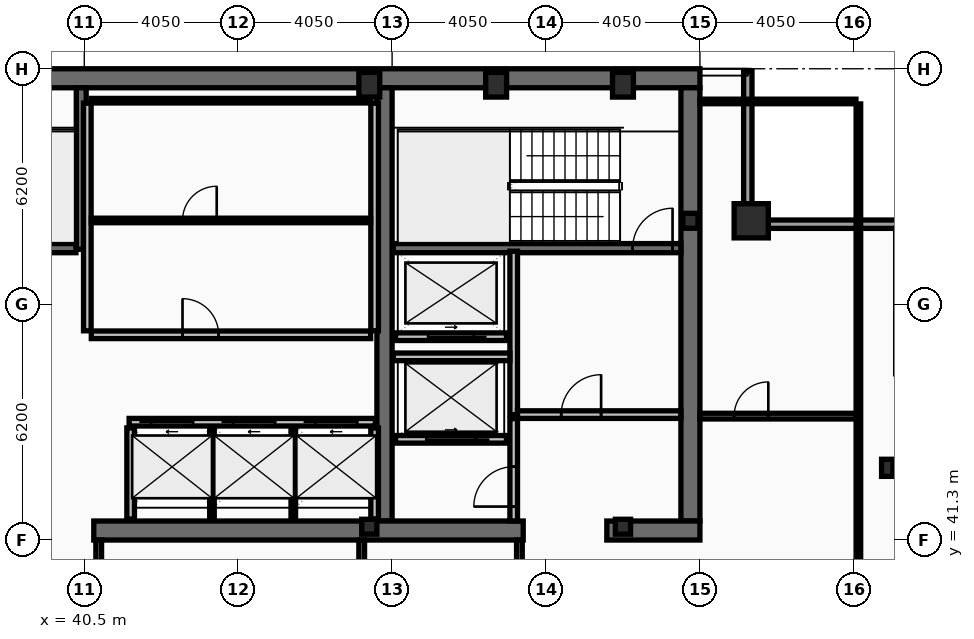
"""IFC4 building model, lengths in metres.
Left out: names, types, materials, properties, quantities, classifications, styles, units other than length and angle.
Written with IfcOpenShell. Run it as: python <this file> out.ifc"""

import sys

from ifc_helpers import new_model, si_unit, direction, frame, frame_2d, origin, origin_2d, place, context, subcontext, project, spatial, rectangle, hollow_rectangle, i_section, extrude, element, fill, save


model = new_model("IFC4")
c1 = context("Model", 3, precision=1e-05, world=origin(), true_north=direction((0.0, 1.0)))
c2 = subcontext(c1, "Body", "Model", "MODEL_VIEW")
j1 = project(units=[si_unit("LENGTHUNIT", "METRE"), si_unit("PLANEANGLEUNIT", "RADIAN")], contexts=[c1])
p1 = place(None, origin())
s1 = spatial("IfcSite", under=j1, at=p1, CompositionType="ELEMENT")
p2 = place(p1, origin())
s2 = spatial("IfcBuilding", under=s1, at=p2, CompositionType="ELEMENT")
p3 = place(p2, frame((0.0, 0.0, 302.2)))
s3 = spatial("IfcBuildingStorey", under=s2, at=p3, CompositionType="ELEMENT", Elevation=302.2)
p4 = place(p3, frame((16.2, 53.45, 0.0), z_axis=(0.0, 0.0, 1.0), x_axis=(1.0, 0.0, 0.0)))
e1 = element("IfcWall", 1, at=p4, inside=s3, PredefinedType="SHEAR", context=c2, shape_type="SweptSolid", body=[
    extrude(rectangle(XDim=40.5, YDim=0.5, at=frame_2d((20.25, 0.0))), origin(), (0.0, 0.0, 1.0), 3.38),
])
p5 = place(p3, frame((56.45, 53.2, 0.0), z_axis=(0.0, 0.0, 1.0), x_axis=(0.0, -1.0, 0.0)))
e2 = element("IfcWall", 2, at=p5, inside=s3, PredefinedType="SHEAR", context=c2, shape_type="SweptSolid", body=[
    extrude(rectangle(XDim=11.4, YDim=0.5, at=frame_2d((5.7, 0.0))), origin(), (0.0, 0.0, 1.0), 3.38),
])
p6 = place(p3, frame((48.4, 41.8, 0.0), z_axis=(0.0, 0.0, 1.0), x_axis=(0.0, 1.0, 0.0)))
e3 = element("IfcWall", 3, at=p6, inside=s3, PredefinedType="SHEAR", context=c2, shape_type="SweptSolid", body=[
    extrude(rectangle(XDim=11.4, YDim=0.4, at=frame_2d((5.7, 0.0))), origin(), (0.0, 0.0, 1.0), 3.38),
])
p7 = place(p3, frame((52.05, 41.55, 0.0), z_axis=(0.0, 0.0, 1.0), x_axis=(-1.0, 0.0, 0.0)))
e4 = element("IfcWall", 4, at=p7, inside=s3, PredefinedType="SHEAR", context=c2, shape_type="SweptSolid", body=[
    extrude(rectangle(XDim=11.3, YDim=0.5, at=frame_2d((5.65, 0.0))), origin(), (0.0, 0.0, 1.0), 3.38),
])
p8 = place(p3, frame((56.7, 41.55, 0.0), z_axis=(0.0, 0.0, 1.0), x_axis=(-1.0, 0.0, 0.0)))
e5 = element("IfcWall", 5, at=p8, inside=s3, PredefinedType="SHEAR", context=c2, shape_type="SweptSolid", body=[
    extrude(rectangle(XDim=2.45, YDim=0.5, at=frame_2d((1.225, 0.0))), origin(), (0.0, 0.0, 1.0), 3.38),
])
p9 = place(p3, frame((40.42, 48.95, 0.0), z_axis=(0.0, 0.0, 1.0), x_axis=(0.0, 1.0, 0.0)))
e6 = element("IfcWall", 6, at=p9, inside=s3, PredefinedType="SHEAR", context=c2, shape_type="SweptSolid", body=[
    extrude(rectangle(XDim=4.25, YDim=0.26, at=frame_2d((2.125, 0.0))), origin(), (0.0, 0.0, 1.0), 3.38),
])
p10 = place(p3, frame((48.63, 48.98, 0.0), z_axis=(0.0, 0.0, 1.0), x_axis=(1.0, 0.0, 0.0)))
e7 = element("IfcWall", 7, at=p10, inside=s3, PredefinedType="SHEAR", context=c2, shape_type="SweptSolid", body=[
    extrude(rectangle(XDim=7.57, YDim=0.24, at=frame_2d((3.785, 0.0))), origin(), (0.0, 0.0, 1.0), 3.38),
])
p11 = place(p10, frame((6.3, 0.0, 0.0)))
e8 = element("IfcOpeningElement", 8, at=p11, cuts=e7, PredefinedType="OPENING", context=c2, shape_type="SweptSolid", body=[
    extrude(rectangle(XDim=1.05, YDim=2.15, at=frame_2d((0.525, 1.075))), frame((0.0, 0.13, 0.0), z_axis=(0.0, -1.0, 0.0), x_axis=(1.0, 0.0, 0.0)), (0.0, 0.0, 1.0), 0.26),
])
p12 = place(p3, frame((32.72, 48.98, 0.0), z_axis=(0.0, 0.0, 1.0), x_axis=(1.0, 0.0, 0.0)))
e9 = element("IfcWall", 9, at=p12, inside=s3, PredefinedType="SHEAR", context=c2, shape_type="SweptSolid", body=[
    extrude(rectangle(XDim=7.56, YDim=0.24, at=frame_2d((3.78, 0.0))), origin(), (0.0, 0.0, 1.0), 3.38),
])
p13 = place(p12, frame((0.22, 0.0, 0.0)))
e10 = element("IfcOpeningElement", 10, at=p13, cuts=e9, PredefinedType="OPENING", context=c2, shape_type="SweptSolid", body=[
    extrude(rectangle(XDim=1.05, YDim=2.15, at=frame_2d((0.525, 1.075))), frame((0.0, 0.13, 0.0), z_axis=(0.0, -1.0, 0.0), x_axis=(1.0, 0.0, 0.0)), (0.0, 0.0, 1.0), 0.26),
])
p14 = place(p3, frame((58.05, 49.7, 0.0), z_axis=(0.0, 0.0, 1.0), x_axis=(1.0, 0.0, 0.0)))
e11 = element("IfcColumn", 11, at=p14, inside=s3, PredefinedType="COLUMN", context=c2, shape_type="SweptSolid", body=[
    extrude(hollow_rectangle(XDim=0.9, YDim=0.9, WallThickness=0.05, at=origin_2d()), origin(), (0.0, 0.0, 1.0), 3.6),
])
for number, where, z_axis, x_axis in (
    (12, (48.0, 53.28, 0.0), (0.0, 0.0, 1.0), (1.0, 0.0, 0.0)),
    (13, (51.337, 53.28, 0.0), (0.0, 0.0, 1.0), (1.0, 0.0, 0.0)),
    (14, (54.675, 53.28, 0.0), (0.0, 0.0, 1.0), (1.0, 0.0, 0.0)),
):
    element("IfcColumn", number, at=place(p3, frame(where, z_axis=z_axis, x_axis=x_axis)), inside=s3, PredefinedType="COLUMN", context=c2, shape_type="SweptSolid", body=[
        extrude(hollow_rectangle(XDim=0.55, YDim=0.65, WallThickness=0.04, at=origin_2d()), origin(), (0.0, 0.0, 1.0), 3.6),
    ])
p15 = place(p3, frame((61.63, 43.2, 0.0), z_axis=(0.0, 0.0, 1.0), x_axis=(1.0, 0.0, 0.0)))
e15 = element("IfcColumn", 15, at=p15, inside=s3, PredefinedType="COLUMN", context=c2, shape_type="SweptSolid", body=[
    extrude(i_section(OverallWidth=0.3, OverallDepth=0.45, WebThickness=0.014, FlangeThickness=0.026, at=origin_2d()), origin(), (0.0, 0.0, 1.0), 3.6),
])
for number, where, z_axis, x_axis in (
    (16, (56.45, 49.7, 0.0), (0.0, 0.0, 1.0), (1.0, 0.0, 0.0)),
    (17, (48.0, 41.65, 0.0), (0.0, 0.0, 1.0), (1.0, 0.0, 0.0)),
    (18, (54.675, 41.65, 0.0), (0.0, 0.0, 1.0), (1.0, 0.0, 0.0)),
):
    element("IfcColumn", number, at=place(p3, frame(where, z_axis=z_axis, x_axis=x_axis)), inside=s3, PredefinedType="COLUMN", context=c2, shape_type="SweptSolid", body=[
        extrude(i_section(OverallWidth=0.399, OverallDepth=0.393, WebThickness=0.023, FlangeThickness=0.037, at=origin_2d()), origin(), (0.0, 0.0, 1.0), 3.6),
    ])
p16 = place(p3, frame((57.96, 53.63, 0.0), z_axis=(0.0, 0.0, 1.0), x_axis=(0.0, -1.0, 0.0)))
e19 = element("IfcWall", 19, at=p16, inside=s3, PredefinedType="SOLIDWALL", context=c2, shape_type="SweptSolid", body=[
    extrude(rectangle(XDim=3.91, YDim=0.22, at=frame_2d((1.955, 0.0))), origin(), (0.0, 0.0, 1.0), 2.82),
])
p17 = place(p3, frame((57.85, 49.61, 0.0), z_axis=(0.0, 0.0, 1.0), x_axis=(1.0, 0.0, 0.0)))
e20 = element("IfcWall", 20, at=p17, inside=s3, PredefinedType="SOLIDWALL", context=c2, shape_type="SweptSolid", body=[
    extrude(rectangle(XDim=4.22, YDim=0.22, at=frame_2d((2.11, 0.0))), origin(), (0.0, 0.0, 1.0), 2.82),
])
p18 = place(p3, frame((41.68, 44.4, 0.0), z_axis=(0.0, 0.0, 1.0), x_axis=(1.0, 0.0, 0.0)))
e21 = element("IfcWall", 21, at=p18, inside=s3, PredefinedType="PARTITIONING", context=c2, shape_type="SweptSolid", body=[
    extrude(rectangle(XDim=6.48, YDim=0.2, at=frame_2d((3.24, 0.0))), origin(), (0.0, 0.0, 1.0), 3.38),
])
p19 = place(p18, frame((0.58, 0.0, 0.0)))
e22 = element("IfcOpeningElement", 22, at=p19, cuts=e21, PredefinedType="OPENING", context=c2, shape_type="SweptSolid", body=[
    extrude(rectangle(XDim=1.1, YDim=2.18, at=frame_2d((0.55, 1.09))), frame((0.0, 0.11, 0.0), z_axis=(0.0, -1.0, 0.0), x_axis=(1.0, 0.0, 0.0)), (0.0, 0.0, 1.0), 0.22),
])
p20 = place(p18, frame((2.74, 0.0, 0.0)))
e23 = element("IfcOpeningElement", 23, at=p20, cuts=e21, PredefinedType="OPENING", context=c2, shape_type="SweptSolid", body=[
    extrude(rectangle(XDim=1.1, YDim=2.18, at=frame_2d((0.55, 1.09))), frame((0.0, 0.11, 0.0), z_axis=(0.0, -1.0, 0.0), x_axis=(1.0, 0.0, 0.0)), (0.0, 0.0, 1.0), 0.22),
])
p21 = place(p18, frame((4.9, 0.0, 0.0)))
e24 = element("IfcOpeningElement", 24, at=p21, cuts=e21, PredefinedType="OPENING", context=c2, shape_type="SweptSolid", body=[
    extrude(rectangle(XDim=1.1, YDim=2.18, at=frame_2d((0.55, 1.09))), frame((0.0, 0.11, 0.0), z_axis=(0.0, -1.0, 0.0), x_axis=(1.0, 0.0, 0.0)), (0.0, 0.0, 1.0), 0.22),
])
p22 = place(p3, frame((51.61, 43.95, 0.0), z_axis=(0.0, 0.0, 1.0), x_axis=(-1.0, 0.0, 0.0)))
e25 = element("IfcWall", 25, at=p22, inside=s3, PredefinedType="PARTITIONING", context=c2, shape_type="SweptSolid", body=[
    extrude(rectangle(XDim=2.92, YDim=0.2, at=frame_2d((1.46, 0.0))), origin(), (0.0, 0.0, 1.0), 3.38),
])
p23 = place(p22, frame((0.81, 0.0, 0.0)))
e26 = element("IfcOpeningElement", 26, at=p23, cuts=e25, PredefinedType="OPENING", context=c2, shape_type="SweptSolid", body=[
    extrude(rectangle(XDim=1.3, YDim=2.18, at=frame_2d((0.65, 1.09))), frame((0.0, 0.11, 0.0), z_axis=(0.0, -1.0, 0.0), x_axis=(1.0, 0.0, 0.0)), (0.0, 0.0, 1.0), 0.22),
])
p24 = place(p3, frame((51.61, 46.65, 0.0), z_axis=(0.0, 0.0, 1.0), x_axis=(-1.0, 0.0, 0.0)))
e27 = element("IfcWall", 27, at=p24, inside=s3, PredefinedType="PARTITIONING", context=c2, shape_type="SweptSolid", body=[
    extrude(rectangle(XDim=2.92, YDim=0.2, at=frame_2d((1.46, 0.0))), origin(), (0.0, 0.0, 1.0), 3.38),
])
p25 = place(p24, frame((0.86, 0.0, 0.0)))
e28 = element("IfcOpeningElement", 28, at=p25, cuts=e27, PredefinedType="OPENING", context=c2, shape_type="SweptSolid", body=[
    extrude(rectangle(XDim=1.2, YDim=2.18, at=frame_2d((0.6, 1.09))), frame((0.0, 0.11, 0.0), z_axis=(0.0, -1.0, 0.0), x_axis=(1.0, 0.0, 0.0)), (0.0, 0.0, 1.0), 0.22),
])
p26 = place(p3, frame((51.8, 44.6, 0.0), z_axis=(0.0, 0.0, 1.0), x_axis=(0.0, 1.0, 0.0)))
e29 = element("IfcWall", 29, at=p26, inside=s3, PredefinedType="PARTITIONING", context=c2, shape_type="SweptSolid", body=[
    extrude(rectangle(XDim=4.3, YDim=0.2, at=frame_2d((2.15, 0.0))), origin(), (0.0, 0.0, 1.0), 3.38),
])
p27 = place(p3, frame((51.9, 44.6, 0.0), z_axis=(0.0, 0.0, 1.0), x_axis=(1.0, 0.0, 0.0)))
e30 = element("IfcWall", 30, at=p27, inside=s3, PredefinedType="PARTITIONING", context=c2, shape_type="SweptSolid", body=[
    extrude(rectangle(XDim=4.3, YDim=0.2, at=frame_2d((2.15, 0.0))), origin(), (0.0, 0.0, 1.0), 3.38),
])
p28 = place(p27, frame((1.15, 0.0, 0.0)))
e31 = element("IfcOpeningElement", 31, at=p28, cuts=e30, PredefinedType="OPENING", context=c2, shape_type="SweptSolid", body=[
    extrude(rectangle(XDim=1.05, YDim=2.15, at=frame_2d((0.525, 1.075))), frame((0.0, 0.11, 0.0), z_axis=(0.0, -1.0, 0.0), x_axis=(1.0, 0.0, 0.0)), (0.0, 0.0, 1.0), 0.22),
])
p29 = place(p3, frame((48.63, 46.12, 0.0), z_axis=(0.0, 0.0, 1.0), x_axis=(1.0, 0.0, 0.0)))
e32 = element("IfcWall", 32, at=p29, inside=s3, PredefinedType="PARTITIONING", context=c2, shape_type="SweptSolid", body=[
    extrude(rectangle(XDim=3.07, YDim=0.2, at=frame_2d((1.535, 0.0))), origin(), (0.0, 0.0, 1.0), 3.38),
])
p30 = place(p3, frame((51.8, 41.8, 0.0), z_axis=(0.0, 0.0, 1.0), x_axis=(0.0, 1.0, 0.0)))
e33 = element("IfcWall", 33, at=p30, inside=s3, PredefinedType="PARTITIONING", context=c2, shape_type="SweptSolid", body=[
    extrude(rectangle(XDim=2.695, YDim=0.2, at=frame_2d((1.348, 0.0))), origin(), (0.0, 0.0, 1.0), 3.38),
])
p31 = place(p30, frame((0.38, 0.0, 0.0)))
e34 = element("IfcOpeningElement", 34, at=p31, cuts=e33, PredefinedType="OPENING", context=c2, shape_type="SweptSolid", body=[
    extrude(rectangle(XDim=1.05, YDim=2.15, at=frame_2d((0.525, 1.075))), frame((0.0, 0.11, 0.0), z_axis=(0.0, -1.0, 0.0), x_axis=(1.0, 0.0, 0.0)), (0.0, 0.0, 1.0), 0.22),
])
for number, where, z_axis, x_axis in (
    (35, (40.58, 46.805, 0.0), (0.0, 0.0, 1.0), (0.0, 1.0, 0.0)),
    (36, (48.14, 46.805, 0.0), (0.0, 0.0, 1.0), (0.0, 1.0, 0.0)),
):
    element("IfcWall", number, at=place(p3, frame(where, z_axis=z_axis, x_axis=x_axis)), inside=s3, PredefinedType="PARTITIONING", context=c2, shape_type="SweptSolid", body=[
        extrude(rectangle(XDim=5.99, YDim=0.2, at=frame_2d((2.995, 0.0))), origin(), (0.0, 0.0, 1.0), 3.38),
    ])
p32 = place(p3, frame((40.685, 52.86, 0.0), z_axis=(0.0, 0.0, 1.0), x_axis=(1.0, 0.0, 0.0)))
e37 = element("IfcWall", 37, at=p32, inside=s3, PredefinedType="PARTITIONING", context=c2, shape_type="SweptSolid", body=[
    extrude(rectangle(XDim=7.35, YDim=0.12, at=frame_2d((3.675, 0.0))), origin(), (0.0, 0.0, 1.0), 3.38),
])
p33 = place(p3, frame((40.685, 49.709, 0.0), z_axis=(0.0, 0.0, 1.0), x_axis=(1.0, 0.0, 0.0)))
e38 = element("IfcWall", 38, at=p33, inside=s3, PredefinedType="PARTITIONING", context=c2, shape_type="SweptSolid", body=[
    extrude(rectangle(XDim=7.35, YDim=0.12, at=frame_2d((3.675, 0.0))), origin(), (0.0, 0.0, 1.0), 3.38),
])
p34 = place(p33, frame((2.4, 0.0, 0.0)))
e39 = element("IfcOpeningElement", 39, at=p34, cuts=e38, PredefinedType="OPENING", context=c2, shape_type="SweptSolid", body=[
    extrude(rectangle(XDim=0.9, YDim=2.05, at=frame_2d((0.45, 1.025))), frame((0.0, 0.07, 0.0), z_axis=(0.0, -1.0, 0.0), x_axis=(1.0, 0.0, 0.0)), (0.0, 0.0, 1.0), 0.14),
])
p35 = place(p3, frame((40.685, 46.7, 0.0), z_axis=(0.0, 0.0, 1.0), x_axis=(1.0, 0.0, 0.0)))
e40 = element("IfcWall", 40, at=p35, inside=s3, PredefinedType="PARTITIONING", context=c2, shape_type="SweptSolid", body=[
    extrude(rectangle(XDim=7.35, YDim=0.2, at=frame_2d((3.675, 0.0))), origin(), (0.0, 0.0, 1.0), 3.38),
])
p36 = place(p35, frame((2.4, 0.0, 0.0)))
e41 = element("IfcOpeningElement", 41, at=p36, cuts=e40, PredefinedType="OPENING", context=c2, shape_type="SweptSolid", body=[
    extrude(rectangle(XDim=0.95, YDim=2.1, at=frame_2d((0.475, 1.05))), frame((0.0, 0.11, 0.0), z_axis=(0.0, -1.0, 0.0), x_axis=(1.0, 0.0, 0.0)), (0.0, 0.0, 1.0), 0.22),
])
for number, where, z_axis, x_axis in (
    (42, (41.72, 41.85, 0.0), (0.0, 0.0, 1.0), (0.0, 1.0, 0.0)),
    (43, (48.14, 41.85, 0.0), (0.0, 0.0, 1.0), (0.0, 1.0, 0.0)),
):
    element("IfcWall", number, at=place(p3, frame(where, z_axis=z_axis, x_axis=x_axis)), inside=s3, PredefinedType="PARTITIONING", context=c2, shape_type="SweptSolid", body=[
        extrude(rectangle(XDim=2.4, YDim=0.2, at=frame_2d((1.2, 0.0))), origin(), (0.0, 0.0, 1.0), 3.38),
    ])
for number, where, z_axis, x_axis in (
    (44, (43.86, 41.85, 0.0), (0.0, 0.0, 1.0), (0.0, 1.0, 0.0)),
    (45, (46.0, 41.85, 0.0), (0.0, 0.0, 1.0), (0.0, 1.0, 0.0)),
):
    element("IfcWall", number, at=place(p3, frame(where, z_axis=z_axis, x_axis=x_axis)), inside=s3, PredefinedType="PARTITIONING", context=c2, shape_type="SweptSolid", body=[
        extrude(rectangle(XDim=2.4, YDim=0.12, at=frame_2d((1.2, 0.0))), origin(), (0.0, 0.0, 1.0), 3.38),
    ])
p37 = place(p3, frame((40.88, 38.28, 0.0), z_axis=(0.0, 0.0, 1.0), x_axis=(0.0, 1.0, 0.0)))
e46 = element("IfcWall", 46, at=p37, inside=s3, PredefinedType="PARTITIONING", context=c2, shape_type="SweptSolid", body=[
    extrude(rectangle(XDim=3.02, YDim=0.15, at=frame_2d((1.51, 0.0))), origin(), (0.0, 0.0, 1.0), 3.38),
])
p38 = place(p3, frame((47.8, 38.28, 0.0), z_axis=(0.0, 0.0, 1.0), x_axis=(0.0, 1.0, 0.0)))
e47 = element("IfcWall", 47, at=p38, inside=s3, PredefinedType="PARTITIONING", context=c2, shape_type="SweptSolid", body=[
    extrude(rectangle(XDim=3.02, YDim=0.15, at=frame_2d((1.51, 0.0))), origin(), (0.0, 0.0, 1.0), 2.72),
])
p39 = place(p3, frame((51.95, 38.28, 0.0), z_axis=(0.0, 0.0, 1.0), x_axis=(0.0, 1.0, 0.0)))
e48 = element("IfcWall", 48, at=p39, inside=s3, PredefinedType="PARTITIONING", context=c2, shape_type="SweptSolid", body=[
    extrude(rectangle(XDim=3.02, YDim=0.15, at=frame_2d((1.51, 0.0))), origin(), (0.0, 0.0, 1.0), 3.38),
])
p40 = place(p3, frame((56.7, 44.56, 0.0), z_axis=(0.0, 0.0, 1.0), x_axis=(1.0, 0.0, 0.0)))
e49 = element("IfcWall", 49, at=p40, inside=s3, PredefinedType="PARTITIONING", context=c2, shape_type="SweptSolid", body=[
    extrude(rectangle(XDim=4.105, YDim=0.15, at=frame_2d((2.052, 0.0))), origin(), (0.0, 0.0, 1.0), 2.82),
])
p41 = place(p40, frame((0.9, 0.0, 0.0)))
e50 = element("IfcOpeningElement", 50, at=p41, cuts=e49, PredefinedType="OPENING", context=c2, shape_type="SweptSolid", body=[
    extrude(rectangle(XDim=0.9, YDim=2.05, at=frame_2d((0.45, 1.025))), frame((0.0, 0.085, 0.0), z_axis=(0.0, -1.0, 0.0), x_axis=(1.0, 0.0, 0.0)), (0.0, 0.0, 1.0), 0.17),
])
p42 = place(p3, frame((60.87, 10.665, 0.0), z_axis=(0.0, 0.0, 1.0), x_axis=(0.0, 1.0, 0.0)))
e51 = element("IfcWall", 51, at=p42, inside=s3, PredefinedType="PARTITIONING", context=c2, shape_type="SweptSolid", body=[
    extrude(rectangle(XDim=42.11, YDim=0.12, at=frame_2d((21.055, 0.0))), origin(), (0.0, 0.0, 1.0), 2.72),
])
p43 = place(p3, frame((56.7, 52.84, 0.0), z_axis=(0.0, 0.0, 1.0), x_axis=(1.0, 0.0, 0.0)))
e52 = element("IfcWall", 52, at=p43, inside=s3, PredefinedType="PARTITIONING", context=c2, shape_type="SweptSolid", body=[
    extrude(rectangle(XDim=4.105, YDim=0.12, at=frame_2d((2.052, 0.0))), origin(), (0.0, 0.0, 1.0), 3.38),
])
p44 = place(p11, origin())
e53 = element("IfcDoor", 53, at=p44, inside=s3, OperationType="SINGLE_SWING_RIGHT", PredefinedType="DOOR", context=c2, shape_type="SweptSolid", body=[
    extrude(rectangle(XDim=1.05, YDim=2.15, at=frame_2d((0.525, 1.075))), frame((0.0, 0.025, 0.0), z_axis=(0.0, -1.0, 0.0), x_axis=(1.0, 0.0, 0.0)), (0.0, 0.0, 1.0), 0.05),
])
fill(e8, e53)
p45 = place(p19, origin())
e54 = element("IfcDoor", 54, at=p45, inside=s3, OperationType="SLIDING_TO_LEFT", PredefinedType="DOOR", context=c2, shape_type="SweptSolid", body=[
    extrude(rectangle(XDim=1.1, YDim=2.18, at=frame_2d((0.55, 1.09))), frame((0.0, 0.025, 0.0), z_axis=(0.0, -1.0, 0.0), x_axis=(1.0, 0.0, 0.0)), (0.0, 0.0, 1.0), 0.05),
])
fill(e22, e54)
p46 = place(p20, origin())
e55 = element("IfcDoor", 55, at=p46, inside=s3, OperationType="SLIDING_TO_LEFT", PredefinedType="DOOR", context=c2, shape_type="SweptSolid", body=[
    extrude(rectangle(XDim=1.1, YDim=2.18, at=frame_2d((0.55, 1.09))), frame((0.0, 0.025, 0.0), z_axis=(0.0, -1.0, 0.0), x_axis=(1.0, 0.0, 0.0)), (0.0, 0.0, 1.0), 0.05),
])
fill(e23, e55)
p47 = place(p21, origin())
e56 = element("IfcDoor", 56, at=p47, inside=s3, OperationType="SLIDING_TO_LEFT", PredefinedType="DOOR", context=c2, shape_type="SweptSolid", body=[
    extrude(rectangle(XDim=1.1, YDim=2.18, at=frame_2d((0.55, 1.09))), frame((0.0, 0.025, 0.0), z_axis=(0.0, -1.0, 0.0), x_axis=(1.0, 0.0, 0.0)), (0.0, 0.0, 1.0), 0.05),
])
fill(e24, e56)
p48 = place(p23, origin())
e57 = element("IfcDoor", 57, at=p48, inside=s3, OperationType="SLIDING_TO_LEFT", PredefinedType="DOOR", context=c2, shape_type="SweptSolid", body=[
    extrude(rectangle(XDim=1.3, YDim=2.18, at=frame_2d((0.65, 1.09))), frame((0.0, 0.025, 0.0), z_axis=(0.0, -1.0, 0.0), x_axis=(1.0, 0.0, 0.0)), (0.0, 0.0, 1.0), 0.05),
])
fill(e26, e57)
p49 = place(p25, origin())
e58 = element("IfcDoor", 58, at=p49, inside=s3, OperationType="SLIDING_TO_LEFT", PredefinedType="DOOR", context=c2, shape_type="SweptSolid", body=[
    extrude(rectangle(XDim=1.2, YDim=2.18, at=frame_2d((0.6, 1.09))), frame((0.0, 0.025, 0.0), z_axis=(0.0, -1.0, 0.0), x_axis=(1.0, 0.0, 0.0)), (0.0, 0.0, 1.0), 0.05),
])
fill(e28, e58)
p50 = place(p28, origin())
e59 = element("IfcDoor", 59, at=p50, inside=s3, OperationType="SINGLE_SWING_RIGHT", PredefinedType="DOOR", context=c2, shape_type="SweptSolid", body=[
    extrude(rectangle(XDim=1.05, YDim=2.15, at=frame_2d((0.525, 1.075))), frame((0.0, 0.025, 0.0), z_axis=(0.0, -1.0, 0.0), x_axis=(1.0, 0.0, 0.0)), (0.0, 0.0, 1.0), 0.05),
])
fill(e31, e59)
p51 = place(p31, origin())
e60 = element("IfcDoor", 60, at=p51, inside=s3, OperationType="SINGLE_SWING_LEFT", PredefinedType="DOOR", context=c2, shape_type="SweptSolid", body=[
    extrude(rectangle(XDim=1.05, YDim=2.15, at=frame_2d((0.525, 1.075))), frame((0.0, 0.025, 0.0), z_axis=(0.0, -1.0, 0.0), x_axis=(1.0, 0.0, 0.0)), (0.0, 0.0, 1.0), 0.05),
])
fill(e34, e60)
p52 = place(p34, origin())
e61 = element("IfcDoor", 61, at=p52, inside=s3, OperationType="SINGLE_SWING_RIGHT", PredefinedType="DOOR", context=c2, shape_type="SweptSolid", body=[
    extrude(rectangle(XDim=0.9, YDim=2.05, at=frame_2d((0.45, 1.025))), frame((0.0, 0.025, 0.0), z_axis=(0.0, -1.0, 0.0), x_axis=(1.0, 0.0, 0.0)), (0.0, 0.0, 1.0), 0.05),
])
fill(e39, e61)
p53 = place(p36, origin())
e62 = element("IfcDoor", 62, at=p53, inside=s3, OperationType="SINGLE_SWING_LEFT", PredefinedType="DOOR", context=c2, shape_type="SweptSolid", body=[
    extrude(rectangle(XDim=0.95, YDim=2.1, at=frame_2d((0.475, 1.05))), frame((0.0, 0.025, 0.0), z_axis=(0.0, -1.0, 0.0), x_axis=(1.0, 0.0, 0.0)), (0.0, 0.0, 1.0), 0.05),
])
fill(e41, e62)
p54 = place(p41, origin())
e63 = element("IfcDoor", 63, at=p54, inside=s3, OperationType="SINGLE_SWING_RIGHT", PredefinedType="DOOR", context=c2, shape_type="SweptSolid", body=[
    extrude(rectangle(XDim=0.9, YDim=2.05, at=frame_2d((0.45, 1.025))), frame((0.0, 0.025, 0.0), z_axis=(0.0, -1.0, 0.0), x_axis=(1.0, 0.0, 0.0)), (0.0, 0.0, 1.0), 0.05),
])
fill(e50, e63)
save(model, sys.argv[1])
